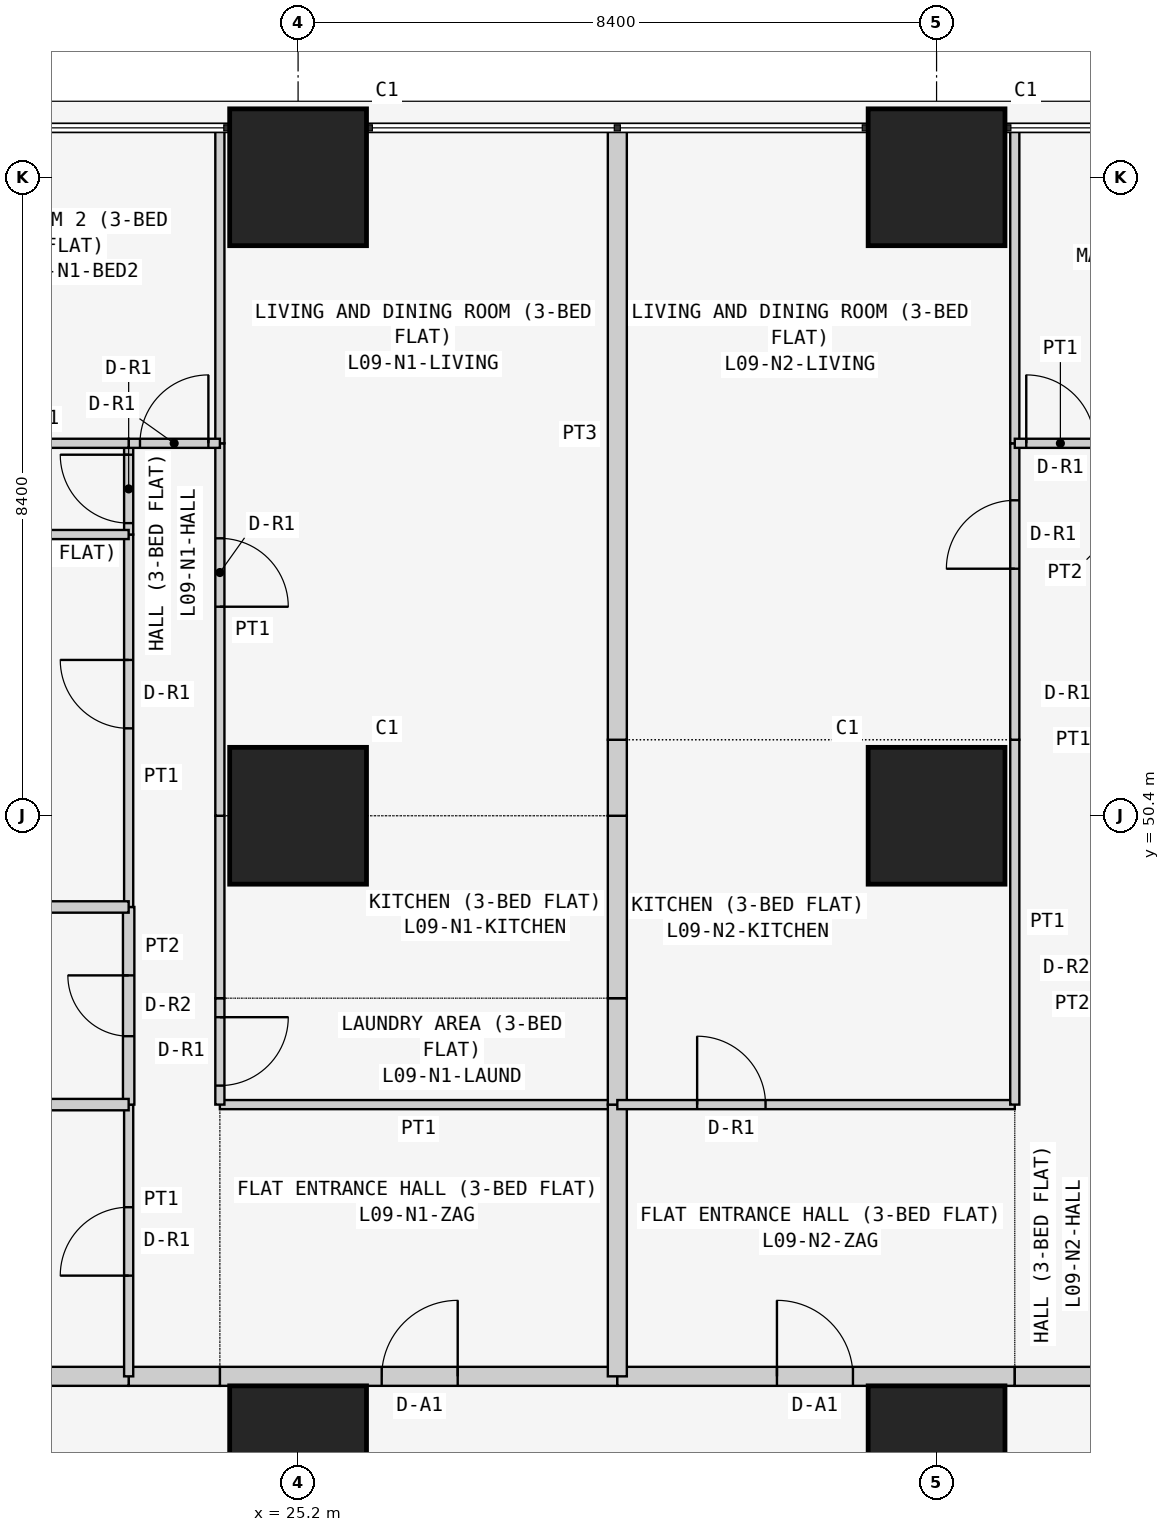
"""IFC4 building model, lengths in metres.
Left out: names, types, materials, properties, quantities, classifications, styles, units other than length and angle.
Written with IfcOpenShell. Run it as: python <this file> out.ifc"""

import sys

from ifc_helpers import new_model, si_unit, direction, frame, frame_2d, origin, origin_2d, place, context, subcontext, project, spatial, rectangle, extrude, element, fill, save


model = new_model("IFC4")
c1 = context("Model", 3, precision=1e-05, world=origin(), true_north=direction((0.0, 1.0)))
c2 = subcontext(c1, "Body", "Model", "MODEL_VIEW")
j1 = project(units=[si_unit("LENGTHUNIT", "METRE"), si_unit("PLANEANGLEUNIT", "RADIAN")], contexts=[c1])
p1 = place(None, origin())
s1 = spatial("IfcSite", under=j1, at=p1, CompositionType="ELEMENT")
p2 = place(p1, origin())
s2 = spatial("IfcBuilding", under=s1, at=p2, CompositionType="ELEMENT")
p3 = place(p2, frame((0.0, 0.0, 41.7)))
s3 = spatial("IfcBuildingStorey", under=s2, at=p3, CompositionType="ELEMENT", Elevation=41.7)
for number, where, z_axis, x_axis in (
    (1, (25.2, 42.0, 0.0), (0.0, 0.0, 1.0), (1.0, 0.0, 0.0)),
    (2, (25.2, 50.4, 0.0), (0.0, 0.0, 1.0), (1.0, 0.0, 0.0)),
    (3, (25.2, 58.8, 0.0), (0.0, 0.0, 1.0), (1.0, 0.0, 0.0)),
    (4, (33.6, 42.0, 0.0), (0.0, 0.0, 1.0), (1.0, 0.0, 0.0)),
    (5, (33.6, 50.4, 0.0), (0.0, 0.0, 1.0), (1.0, 0.0, 0.0)),
    (6, (33.6, 58.8, 0.0), (0.0, 0.0, 1.0), (1.0, 0.0, 0.0)),
):
    element("IfcColumn", number, at=place(p3, frame(where, z_axis=z_axis, x_axis=x_axis)), inside=s3, PredefinedType="COLUMN", context=c2, shape_type="SweptSolid", body=[
        extrude(rectangle(XDim=1.8, YDim=1.8, at=origin_2d()), origin(), (0.0, 0.0, 1.0), 3.6),
    ])
p4 = place(p3, frame((24.171, 43.025, 0.0), z_axis=(0.0, 0.0, 1.0), x_axis=(1.0, 0.0, 0.0)))
e7 = element("IfcWall", 7, at=p4, inside=s3, PredefinedType="PARTITIONING", context=c2, shape_type="SweptSolid", body=[
    extrude(rectangle(XDim=5.229, YDim=0.25, at=frame_2d((2.615, 0.0))), origin(), (0.0, 0.0, 1.0), 3.45),
])
p5 = place(p4, frame((2.129, 0.0, 0.0)))
e8 = element("IfcOpeningElement", 8, at=p5, cuts=e7, PredefinedType="OPENING", context=c2, shape_type="SweptSolid", body=[
    extrude(rectangle(XDim=1.0, YDim=2.1, at=frame_2d((0.5, 1.05))), frame((0.0, 0.135, 0.0), z_axis=(0.0, -1.0, 0.0), x_axis=(1.0, 0.0, 0.0)), (0.0, 0.0, 1.0), 0.27),
])
p6 = place(p3, frame((22.971, 43.025, 0.0), z_axis=(0.0, 0.0, 1.0), x_axis=(1.0, 0.0, 0.0)))
e9 = element("IfcWall", 9, at=p6, inside=s3, PredefinedType="PARTITIONING", context=c2, shape_type="SweptSolid", body=[
    extrude(rectangle(XDim=1.2, YDim=0.25, at=frame_2d((0.6, 0.0))), origin(), (0.0, 0.0, 1.0), 3.45),
])
p7 = place(p3, frame((16.1, 43.025, 0.0), z_axis=(0.0, 0.0, 1.0), x_axis=(1.0, 0.0, 0.0)))
e10 = element("IfcWall", 10, at=p7, inside=s3, PredefinedType="PARTITIONING", context=c2, shape_type="SweptSolid", body=[
    extrude(rectangle(XDim=6.871, YDim=0.25, at=frame_2d((3.436, 0.0))), origin(), (0.0, 0.0, 1.0), 3.45),
])
p8 = place(p3, frame((29.4, 43.025, 0.0), z_axis=(0.0, 0.0, 1.0), x_axis=(1.0, 0.0, 0.0)))
e11 = element("IfcWall", 11, at=p8, inside=s3, PredefinedType="PARTITIONING", context=c2, shape_type="SweptSolid", body=[
    extrude(rectangle(XDim=5.229, YDim=0.25, at=frame_2d((2.615, 0.0))), origin(), (0.0, 0.0, 1.0), 3.45),
])
p9 = place(p8, frame((2.1, 0.0, 0.0)))
e12 = element("IfcOpeningElement", 12, at=p9, cuts=e11, PredefinedType="OPENING", context=c2, shape_type="SweptSolid", body=[
    extrude(rectangle(XDim=1.0, YDim=2.1, at=frame_2d((0.5, 1.05))), frame((0.0, 0.135, 0.0), z_axis=(0.0, -1.0, 0.0), x_axis=(1.0, 0.0, 0.0)), (0.0, 0.0, 1.0), 0.27),
])
p10 = place(p3, frame((34.629, 43.025, 0.0), z_axis=(0.0, 0.0, 1.0), x_axis=(1.0, 0.0, 0.0)))
e13 = element("IfcWall", 13, at=p10, inside=s3, PredefinedType="PARTITIONING", context=c2, shape_type="SweptSolid", body=[
    extrude(rectangle(XDim=1.2, YDim=0.25, at=frame_2d((0.6, 0.0))), origin(), (0.0, 0.0, 1.0), 3.45),
])
p11 = place(p3, frame((29.4, 46.6, 0.0), z_axis=(0.0, 0.0, 1.0), x_axis=(-1.0, 0.0, 0.0)))
e14 = element("IfcWall", 14, at=p11, inside=s3, PredefinedType="PARTITIONING", context=c2, shape_type="SweptSolid", body=[
    extrude(rectangle(XDim=5.229, YDim=0.12, at=frame_2d((2.615, 0.0))), origin(), (0.0, 0.0, 1.0), 3.45),
])
p12 = place(p3, frame((29.4, 43.025, 0.0), z_axis=(0.0, 0.0, 1.0), x_axis=(0.0, 1.0, 0.0)))
e15 = element("IfcWall", 15, at=p12, inside=s3, PredefinedType="PARTITIONING", context=c2, shape_type="SweptSolid", body=[
    extrude(rectangle(XDim=3.575, YDim=0.25, at=frame_2d((1.788, 0.0))), origin(), (0.0, 0.0, 1.0), 2.848),
])
p13 = place(p3, frame((24.171, 48.0, 0.0), z_axis=(0.0, 0.0, 1.0), x_axis=(0.0, -1.0, 0.0)))
e16 = element("IfcWall", 16, at=p13, inside=s3, PredefinedType="PARTITIONING", context=c2, shape_type="SweptSolid", body=[
    extrude(rectangle(XDim=1.4, YDim=0.12, at=frame_2d((0.7, 0.0))), origin(), (0.0, 0.0, 1.0), 3.45),
])
p14 = place(p13, frame((0.25, 0.0, 0.0)))
e17 = element("IfcOpeningElement", 17, at=p14, cuts=e16, PredefinedType="OPENING", context=c2, shape_type="SweptSolid", body=[
    extrude(rectangle(XDim=0.9, YDim=2.1, at=frame_2d((0.45, 1.05))), frame((0.0, 0.07, 0.0), z_axis=(0.0, -1.0, 0.0), x_axis=(1.0, 0.0, 0.0)), (0.0, 0.0, 1.0), 0.14),
])
p15 = place(p3, frame((29.4, 46.6, 0.0), z_axis=(0.0, 0.0, 1.0), x_axis=(0.0, 1.0, 0.0)))
e18 = element("IfcWall", 18, at=p15, inside=s3, PredefinedType="PARTITIONING", context=c2, shape_type="SweptSolid", body=[
    extrude(rectangle(XDim=1.4, YDim=0.25, at=frame_2d((0.7, 0.0))), origin(), (0.0, 0.0, 1.0), 2.848),
])
p16 = place(p3, frame((24.171, 50.4, 0.0), z_axis=(0.0, 0.0, 1.0), x_axis=(0.0, -1.0, 0.0)))
e19 = element("IfcWall", 19, at=p16, inside=s3, PredefinedType="PARTITIONING", context=c2, shape_type="SweptSolid", body=[
    extrude(rectangle(XDim=2.4, YDim=0.12, at=frame_2d((1.2, 0.0))), origin(), (0.0, 0.0, 1.0), 3.45),
])
p17 = place(p3, frame((29.4, 48.0, 0.0), z_axis=(0.0, 0.0, 1.0), x_axis=(0.0, 1.0, 0.0)))
e20 = element("IfcWall", 20, at=p17, inside=s3, PredefinedType="PARTITIONING", context=c2, shape_type="SweptSolid", body=[
    extrude(rectangle(XDim=2.4, YDim=0.25, at=frame_2d((1.2, 0.0))), origin(), (0.0, 0.0, 1.0), 2.848),
])
p18 = place(p3, frame((24.171, 55.3, 0.0), z_axis=(0.0, 0.0, 1.0), x_axis=(0.0, -1.0, 0.0)))
e21 = element("IfcWall", 21, at=p18, inside=s3, PredefinedType="PARTITIONING", context=c2, shape_type="SweptSolid", body=[
    extrude(rectangle(XDim=4.9, YDim=0.12, at=frame_2d((2.45, 0.0))), origin(), (0.0, 0.0, 1.0), 3.45),
])
p19 = place(p18, frame((1.25, 0.0, 0.0)))
e22 = element("IfcOpeningElement", 22, at=p19, cuts=e21, PredefinedType="OPENING", context=c2, shape_type="SweptSolid", body=[
    extrude(rectangle(XDim=0.9, YDim=2.1, at=frame_2d((0.45, 1.05))), frame((0.0, 0.07, 0.0), z_axis=(0.0, -1.0, 0.0), x_axis=(1.0, 0.0, 0.0)), (0.0, 0.0, 1.0), 0.14),
])
p20 = place(p3, frame((24.171, 59.45, 0.0), z_axis=(0.0, 0.0, 1.0), x_axis=(0.0, -1.0, 0.0)))
e23 = element("IfcWall", 23, at=p20, inside=s3, PredefinedType="PARTITIONING", context=c2, shape_type="SweptSolid", body=[
    extrude(rectangle(XDim=4.15, YDim=0.12, at=frame_2d((2.075, 0.0))), origin(), (0.0, 0.0, 1.0), 3.45),
])
p21 = place(p3, frame((29.4, 50.4, 0.0), z_axis=(0.0, 0.0, 1.0), x_axis=(0.0, 1.0, 0.0)))
e24 = element("IfcWall", 24, at=p21, inside=s3, PredefinedType="PARTITIONING", context=c2, shape_type="SweptSolid", body=[
    extrude(rectangle(XDim=1.0, YDim=0.25, at=frame_2d((0.5, 0.0))), origin(), (0.0, 0.0, 1.0), 2.848),
])
p22 = place(p3, frame((29.4, 51.4, 0.0), z_axis=(0.0, 0.0, 1.0), x_axis=(0.0, 1.0, 0.0)))
e25 = element("IfcWall", 25, at=p22, inside=s3, PredefinedType="PARTITIONING", context=c2, shape_type="SweptSolid", body=[
    extrude(rectangle(XDim=8.05, YDim=0.25, at=frame_2d((4.025, 0.0))), origin(), (0.0, 0.0, 1.0), 2.848),
])
p23 = place(p3, frame((22.971, 46.6, 0.0), z_axis=(0.0, 0.0, 1.0), x_axis=(0.0, -1.0, 0.0)))
e26 = element("IfcWall", 26, at=p23, inside=s3, PredefinedType="PARTITIONING", context=c2, shape_type="SweptSolid", body=[
    extrude(rectangle(XDim=3.575, YDim=0.12, at=frame_2d((1.788, 0.0))), origin(), (0.0, 0.0, 1.0), 3.45),
])
p24 = place(p23, frame((1.35, 0.0, 0.0)))
e27 = element("IfcOpeningElement", 27, at=p24, cuts=e26, PredefinedType="OPENING", context=c2, shape_type="SweptSolid", body=[
    extrude(rectangle(XDim=0.9, YDim=2.1, at=frame_2d((0.45, 1.05))), frame((0.0, 0.07, 0.0), z_axis=(0.0, -1.0, 0.0), x_axis=(1.0, 0.0, 0.0)), (0.0, 0.0, 1.0), 0.14),
])
p25 = place(p3, frame((22.971, 49.2, 0.0), z_axis=(0.0, 0.0, 1.0), x_axis=(0.0, -1.0, 0.0)))
e28 = element("IfcWall", 28, at=p25, inside=s3, PredefinedType="PARTITIONING", context=c2, shape_type="SweptSolid", body=[
    extrude(rectangle(XDim=2.6, YDim=0.15, at=frame_2d((1.3, 0.0))), origin(), (0.0, 0.0, 1.0), 3.45),
])
p26 = place(p25, frame((0.9, 0.0, 0.0)))
e29 = element("IfcOpeningElement", 29, at=p26, cuts=e28, PredefinedType="OPENING", context=c2, shape_type="SweptSolid", body=[
    extrude(rectangle(XDim=0.8, YDim=2.1, at=frame_2d((0.4, 1.05))), frame((0.0, 0.085, 0.0), z_axis=(0.0, -1.0, 0.0), x_axis=(1.0, 0.0, 0.0)), (0.0, 0.0, 1.0), 0.17),
])
p27 = place(p3, frame((22.971, 54.1, 0.0), z_axis=(0.0, 0.0, 1.0), x_axis=(0.0, -1.0, 0.0)))
e30 = element("IfcWall", 30, at=p27, inside=s3, PredefinedType="PARTITIONING", context=c2, shape_type="SweptSolid", body=[
    extrude(rectangle(XDim=4.9, YDim=0.12, at=frame_2d((2.45, 0.0))), origin(), (0.0, 0.0, 1.0), 3.45),
])
p28 = place(p27, frame((1.65, 0.0, 0.0)))
e31 = element("IfcOpeningElement", 31, at=p28, cuts=e30, PredefinedType="OPENING", context=c2, shape_type="SweptSolid", body=[
    extrude(rectangle(XDim=0.9, YDim=2.1, at=frame_2d((0.45, 1.05))), frame((0.0, 0.07, 0.0), z_axis=(0.0, -1.0, 0.0), x_axis=(1.0, 0.0, 0.0)), (0.0, 0.0, 1.0), 0.14),
])
p29 = place(p3, frame((22.971, 55.3, 0.0), z_axis=(0.0, 0.0, 1.0), x_axis=(0.0, -1.0, 0.0)))
e32 = element("IfcWall", 32, at=p29, inside=s3, PredefinedType="PARTITIONING", context=c2, shape_type="SweptSolid", body=[
    extrude(rectangle(XDim=1.2, YDim=0.12, at=frame_2d((0.6, 0.0))), origin(), (0.0, 0.0, 1.0), 3.45),
])
p30 = place(p29, frame((0.15, 0.0, 0.0)))
e33 = element("IfcOpeningElement", 33, at=p30, cuts=e32, PredefinedType="OPENING", context=c2, shape_type="SweptSolid", body=[
    extrude(rectangle(XDim=0.9, YDim=2.1, at=frame_2d((0.45, 1.05))), frame((0.0, 0.07, 0.0), z_axis=(0.0, -1.0, 0.0), x_axis=(1.0, 0.0, 0.0)), (0.0, 0.0, 1.0), 0.14),
])
p31 = place(p3, frame((24.171, 55.3, 0.0), z_axis=(0.0, 0.0, 1.0), x_axis=(-1.0, 0.0, 0.0)))
e34 = element("IfcWall", 34, at=p31, inside=s3, PredefinedType="PARTITIONING", context=c2, shape_type="SweptSolid", body=[
    extrude(rectangle(XDim=1.2, YDim=0.12, at=frame_2d((0.6, 0.0))), origin(), (0.0, 0.0, 1.0), 3.45),
])
p32 = place(p31, frame((0.151, 0.0, 0.0)))
e35 = element("IfcOpeningElement", 35, at=p32, cuts=e34, PredefinedType="OPENING", context=c2, shape_type="SweptSolid", body=[
    extrude(rectangle(XDim=0.9, YDim=2.1, at=frame_2d((0.45, 1.05))), frame((0.0, 0.07, 0.0), z_axis=(0.0, -1.0, 0.0), x_axis=(1.0, 0.0, 0.0)), (0.0, 0.0, 1.0), 0.14),
])
for number, where, z_axis, x_axis in (
    (36, (22.971, 46.6, 0.0), (0.0, 0.0, 1.0), (-1.0, 0.0, 0.0)),
    (37, (22.971, 49.2, 0.0), (0.0, 0.0, 1.0), (-1.0, 0.0, 0.0)),
):
    element("IfcWall", number, at=place(p3, frame(where, z_axis=z_axis, x_axis=x_axis)), inside=s3, PredefinedType="PARTITIONING", context=c2, shape_type="SweptSolid", body=[
        extrude(rectangle(XDim=2.971, YDim=0.15, at=frame_2d((1.485, 0.0))), origin(), (0.0, 0.0, 1.0), 3.45),
    ])
for number, where, z_axis, x_axis in (
    (38, (22.971, 54.1, 0.0), (0.0, 0.0, 1.0), (-1.0, 0.0, 0.0)),
    (39, (22.971, 55.3, 0.0), (0.0, 0.0, 1.0), (-1.0, 0.0, 0.0)),
):
    element("IfcWall", number, at=place(p3, frame(where, z_axis=z_axis, x_axis=x_axis)), inside=s3, PredefinedType="PARTITIONING", context=c2, shape_type="SweptSolid", body=[
        extrude(rectangle(XDim=2.285, YDim=0.12, at=frame_2d((1.143, 0.0))), origin(), (0.0, 0.0, 1.0), 3.45),
    ])
p33 = place(p3, frame((29.4, 46.6, 0.0), z_axis=(0.0, 0.0, 1.0), x_axis=(1.0, 0.0, 0.0)))
e40 = element("IfcWall", 40, at=p33, inside=s3, PredefinedType="PARTITIONING", context=c2, shape_type="SweptSolid", body=[
    extrude(rectangle(XDim=5.229, YDim=0.12, at=frame_2d((2.615, 0.0))), origin(), (0.0, 0.0, 1.0), 3.45),
])
p34 = place(p33, frame((1.05, 0.0, 0.0)))
e41 = element("IfcOpeningElement", 41, at=p34, cuts=e40, PredefinedType="OPENING", context=c2, shape_type="SweptSolid", body=[
    extrude(rectangle(XDim=0.9, YDim=2.1, at=frame_2d((0.45, 1.05))), frame((0.0, 0.07, 0.0), z_axis=(0.0, -1.0, 0.0), x_axis=(1.0, 0.0, 0.0)), (0.0, 0.0, 1.0), 0.14),
])
p35 = place(p3, frame((34.629, 51.4, 0.0), z_axis=(0.0, 0.0, 1.0), x_axis=(0.0, -1.0, 0.0)))
e42 = element("IfcWall", 42, at=p35, inside=s3, PredefinedType="PARTITIONING", context=c2, shape_type="SweptSolid", body=[
    extrude(rectangle(XDim=4.8, YDim=0.12, at=frame_2d((2.4, 0.0))), origin(), (0.0, 0.0, 1.0), 3.45),
])
p36 = place(p3, frame((34.629, 55.3, 0.0), z_axis=(0.0, 0.0, 1.0), x_axis=(0.0, -1.0, 0.0)))
e43 = element("IfcWall", 43, at=p36, inside=s3, PredefinedType="PARTITIONING", context=c2, shape_type="SweptSolid", body=[
    extrude(rectangle(XDim=3.9, YDim=0.12, at=frame_2d((1.95, 0.0))), origin(), (0.0, 0.0, 1.0), 3.45),
])
p37 = place(p36, frame((0.75, 0.0, 0.0)))
e44 = element("IfcOpeningElement", 44, at=p37, cuts=e43, PredefinedType="OPENING", context=c2, shape_type="SweptSolid", body=[
    extrude(rectangle(XDim=0.9, YDim=2.1, at=frame_2d((0.45, 1.05))), frame((0.0, 0.07, 0.0), z_axis=(0.0, -1.0, 0.0), x_axis=(1.0, 0.0, 0.0)), (0.0, 0.0, 1.0), 0.14),
])
p38 = place(p3, frame((34.629, 59.45, 0.0), z_axis=(0.0, 0.0, 1.0), x_axis=(0.0, -1.0, 0.0)))
e45 = element("IfcWall", 45, at=p38, inside=s3, PredefinedType="PARTITIONING", context=c2, shape_type="SweptSolid", body=[
    extrude(rectangle(XDim=4.15, YDim=0.12, at=frame_2d((2.075, 0.0))), origin(), (0.0, 0.0, 1.0), 3.45),
])
p39 = place(p3, frame((34.629, 55.3, 0.0), z_axis=(0.0, 0.0, 1.0), x_axis=(1.0, 0.0, 0.0)))
e46 = element("IfcWall", 46, at=p39, inside=s3, PredefinedType="PARTITIONING", context=c2, shape_type="SweptSolid", body=[
    extrude(rectangle(XDim=1.2, YDim=0.12, at=frame_2d((0.6, 0.0))), origin(), (0.0, 0.0, 1.0), 3.45),
])
p40 = place(p39, frame((0.151, 0.0, 0.0)))
e47 = element("IfcOpeningElement", 47, at=p40, cuts=e46, PredefinedType="OPENING", context=c2, shape_type="SweptSolid", body=[
    extrude(rectangle(XDim=0.9, YDim=2.1, at=frame_2d((0.45, 1.05))), frame((0.0, 0.07, 0.0), z_axis=(0.0, -1.0, 0.0), x_axis=(1.0, 0.0, 0.0)), (0.0, 0.0, 1.0), 0.14),
])
p41 = place(p5, origin())
e48 = element("IfcDoor", 48, at=p41, inside=s3, OperationType="SINGLE_SWING_RIGHT", PredefinedType="DOOR", context=c2, shape_type="SweptSolid", body=[
    extrude(rectangle(XDim=1.0, YDim=2.1, at=frame_2d((0.5, 1.05))), frame((0.0, 0.025, 0.0), z_axis=(0.0, -1.0, 0.0), x_axis=(1.0, 0.0, 0.0)), (0.0, 0.0, 1.0), 0.05),
])
fill(e8, e48)
p42 = place(p14, origin())
e49 = element("IfcDoor", 49, at=p42, inside=s3, OperationType="SINGLE_SWING_LEFT", PredefinedType="DOOR", context=c2, shape_type="SweptSolid", body=[
    extrude(rectangle(XDim=0.9, YDim=2.1, at=frame_2d((0.45, 1.05))), frame((0.0, 0.025, 0.0), z_axis=(0.0, -1.0, 0.0), x_axis=(1.0, 0.0, 0.0)), (0.0, 0.0, 1.0), 0.05),
])
fill(e17, e49)
p43 = place(p19, origin())
e50 = element("IfcDoor", 50, at=p43, inside=s3, OperationType="SINGLE_SWING_RIGHT", PredefinedType="DOOR", context=c2, shape_type="SweptSolid", body=[
    extrude(rectangle(XDim=0.9, YDim=2.1, at=frame_2d((0.45, 1.05))), frame((0.0, 0.025, 0.0), z_axis=(0.0, -1.0, 0.0), x_axis=(1.0, 0.0, 0.0)), (0.0, 0.0, 1.0), 0.05),
])
fill(e22, e50)
p44 = place(p24, frame((0.9, 0.0, 0.0), z_axis=(0.0, 0.0, 1.0), x_axis=(-1.0, 0.0, 0.0)))
e51 = element("IfcDoor", 51, at=p44, inside=s3, OperationType="SINGLE_SWING_LEFT", PredefinedType="DOOR", context=c2, shape_type="SweptSolid", body=[
    extrude(rectangle(XDim=0.9, YDim=2.1, at=frame_2d((0.45, 1.05))), frame((0.0, 0.025, 0.0), z_axis=(0.0, -1.0, 0.0), x_axis=(1.0, 0.0, 0.0)), (0.0, 0.0, 1.0), 0.05),
])
fill(e27, e51)
p45 = place(p26, frame((0.8, 0.0, 0.0), z_axis=(0.0, 0.0, 1.0), x_axis=(-1.0, 0.0, 0.0)))
e52 = element("IfcDoor", 52, at=p45, inside=s3, OperationType="SINGLE_SWING_RIGHT", PredefinedType="DOOR", context=c2, shape_type="SweptSolid", body=[
    extrude(rectangle(XDim=0.8, YDim=2.1, at=frame_2d((0.4, 1.05))), frame((0.0, 0.025, 0.0), z_axis=(0.0, -1.0, 0.0), x_axis=(1.0, 0.0, 0.0)), (0.0, 0.0, 1.0), 0.05),
])
fill(e29, e52)
p46 = place(p28, frame((0.9, 0.0, 0.0), z_axis=(0.0, 0.0, 1.0), x_axis=(-1.0, 0.0, 0.0)))
e53 = element("IfcDoor", 53, at=p46, inside=s3, OperationType="SINGLE_SWING_RIGHT", PredefinedType="DOOR", context=c2, shape_type="SweptSolid", body=[
    extrude(rectangle(XDim=0.9, YDim=2.1, at=frame_2d((0.45, 1.05))), frame((0.0, 0.025, 0.0), z_axis=(0.0, -1.0, 0.0), x_axis=(1.0, 0.0, 0.0)), (0.0, 0.0, 1.0), 0.05),
])
fill(e31, e53)
p47 = place(p30, frame((0.9, 0.0, 0.0), z_axis=(0.0, 0.0, 1.0), x_axis=(-1.0, 0.0, 0.0)))
e54 = element("IfcDoor", 54, at=p47, inside=s3, OperationType="SINGLE_SWING_RIGHT", PredefinedType="DOOR", context=c2, shape_type="SweptSolid", body=[
    extrude(rectangle(XDim=0.9, YDim=2.1, at=frame_2d((0.45, 1.05))), frame((0.0, 0.025, 0.0), z_axis=(0.0, -1.0, 0.0), x_axis=(1.0, 0.0, 0.0)), (0.0, 0.0, 1.0), 0.05),
])
fill(e33, e54)
p48 = place(p32, frame((0.9, 0.0, 0.0), z_axis=(0.0, 0.0, 1.0), x_axis=(-1.0, 0.0, 0.0)))
e55 = element("IfcDoor", 55, at=p48, inside=s3, OperationType="SINGLE_SWING_RIGHT", PredefinedType="DOOR", context=c2, shape_type="SweptSolid", body=[
    extrude(rectangle(XDim=0.9, YDim=2.1, at=frame_2d((0.45, 1.05))), frame((0.0, 0.025, 0.0), z_axis=(0.0, -1.0, 0.0), x_axis=(1.0, 0.0, 0.0)), (0.0, 0.0, 1.0), 0.05),
])
fill(e35, e55)
p49 = place(p9, origin())
e56 = element("IfcDoor", 56, at=p49, inside=s3, OperationType="SINGLE_SWING_LEFT", PredefinedType="DOOR", context=c2, shape_type="SweptSolid", body=[
    extrude(rectangle(XDim=1.0, YDim=2.1, at=frame_2d((0.5, 1.05))), frame((0.0, 0.025, 0.0), z_axis=(0.0, -1.0, 0.0), x_axis=(1.0, 0.0, 0.0)), (0.0, 0.0, 1.0), 0.05),
])
fill(e12, e56)
p50 = place(p34, origin())
e57 = element("IfcDoor", 57, at=p50, inside=s3, OperationType="SINGLE_SWING_LEFT", PredefinedType="DOOR", context=c2, shape_type="SweptSolid", body=[
    extrude(rectangle(XDim=0.9, YDim=2.1, at=frame_2d((0.45, 1.05))), frame((0.0, 0.025, 0.0), z_axis=(0.0, -1.0, 0.0), x_axis=(1.0, 0.0, 0.0)), (0.0, 0.0, 1.0), 0.05),
])
fill(e41, e57)
p51 = place(p37, frame((0.9, 0.0, 0.0), z_axis=(0.0, 0.0, 1.0), x_axis=(-1.0, 0.0, 0.0)))
e58 = element("IfcDoor", 58, at=p51, inside=s3, OperationType="SINGLE_SWING_LEFT", PredefinedType="DOOR", context=c2, shape_type="SweptSolid", body=[
    extrude(rectangle(XDim=0.9, YDim=2.1, at=frame_2d((0.45, 1.05))), frame((0.0, 0.025, 0.0), z_axis=(0.0, -1.0, 0.0), x_axis=(1.0, 0.0, 0.0)), (0.0, 0.0, 1.0), 0.05),
])
fill(e44, e58)
p52 = place(p40, origin())
e59 = element("IfcDoor", 59, at=p52, inside=s3, OperationType="SINGLE_SWING_LEFT", PredefinedType="DOOR", context=c2, shape_type="SweptSolid", body=[
    extrude(rectangle(XDim=0.9, YDim=2.1, at=frame_2d((0.45, 1.05))), frame((0.0, 0.025, 0.0), z_axis=(0.0, -1.0, 0.0), x_axis=(1.0, 0.0, 0.0)), (0.0, 0.0, 1.0), 0.05),
])
fill(e47, e59)
save(model, sys.argv[1])
